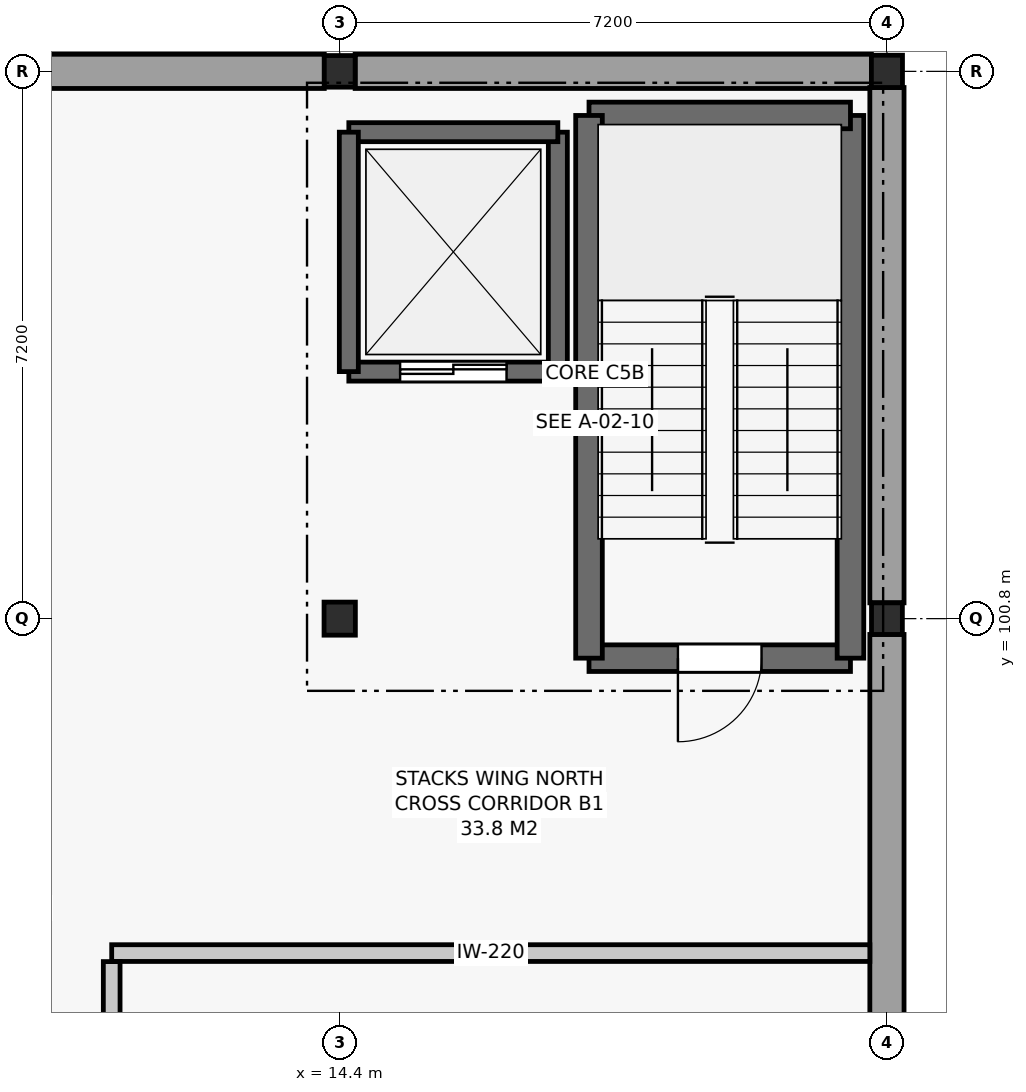
"""IFC4 building model, lengths in metres.
Left out: names, types, materials, properties, quantities, classifications, styles, units other than length and angle.
Written with IfcOpenShell. Run it as: python <this file> out.ifc"""

import sys

from ifc_helpers import new_model, si_unit, direction, frame, frame_2d, origin, origin_2d, place, context, subcontext, project, spatial, rectangle, i_section, extrude, element, fill, save


model = new_model("IFC4")
c1 = context("Model", 3, precision=1e-05, world=origin(), true_north=direction((0.0, 1.0)))
c2 = subcontext(c1, "Body", "Model", "MODEL_VIEW")
j1 = project(units=[si_unit("LENGTHUNIT", "METRE"), si_unit("PLANEANGLEUNIT", "RADIAN")], contexts=[c1])
p1 = place(None, origin())
s1 = spatial("IfcSite", under=j1, at=p1, CompositionType="ELEMENT")
p2 = place(p1, origin())
s2 = spatial("IfcBuilding", under=s1, at=p2, CompositionType="ELEMENT")
p3 = place(p2, frame((0.0, 0.0, -4.2)))
s3 = spatial("IfcBuildingStorey", under=s2, at=p3, CompositionType="ELEMENT", Elevation=-4.2)
p4 = place(p3, frame((14.4, 100.8, 0.0), z_axis=(0.0, 0.0, 1.0), x_axis=(1.0, 0.0, 0.0)))
e1 = element("IfcColumn", 1, at=p4, inside=s3, PredefinedType="COLUMN", context=c2, shape_type="SweptSolid", body=[
    extrude(i_section(OverallWidth=0.412, OverallDepth=0.435, WebThickness=0.025, FlangeThickness=0.042, FilletRadius=0.015, at=origin_2d()), origin(), (0.0, 0.0, 1.0), 4.2),
])
for number, where, z_axis, x_axis in (
    (2, (14.4, 108.0, 0.0), (0.0, 0.0, 1.0), (1.0, 0.0, 0.0)),
    (3, (21.6, 100.8, 0.0), (0.0, 0.0, 1.0), (1.0, 0.0, 0.0)),
):
    element("IfcColumn", number, at=place(p3, frame(where, z_axis=z_axis, x_axis=x_axis)), inside=s3, PredefinedType="COLUMN", context=c2, shape_type="SweptSolid", body=[
        extrude(i_section(OverallWidth=0.406, OverallDepth=0.416, WebThickness=0.021, FlangeThickness=0.034, FilletRadius=0.015, at=origin_2d()), origin(), (0.0, 0.0, 1.0), 4.2),
    ])
p5 = place(p3, frame((21.6, 108.0, 0.0), z_axis=(0.0, 0.0, 1.0), x_axis=(1.0, 0.0, 0.0)))
e4 = element("IfcColumn", 4, at=p5, inside=s3, PredefinedType="COLUMN", context=c2, shape_type="SweptSolid", body=[
    extrude(i_section(OverallWidth=0.409, OverallDepth=0.425, WebThickness=0.023, FlangeThickness=0.039, FilletRadius=0.015, at=origin_2d()), origin(), (0.0, 0.0, 1.0), 4.2),
])
p6 = place(p3, frame((7.403, 108.0, 0.0), z_axis=(0.0, 0.0, 1.0), x_axis=(1.0, 0.0, 0.0)))
e5 = element("IfcWall", 5, at=p6, inside=s3, PredefinedType="USERDEFINED", context=c2, shape_type="SweptSolid", body=[
    extrude(rectangle(XDim=6.794, YDim=0.45, at=frame_2d((3.397, 0.0))), origin(), (0.0, 0.0, 1.0), 3.26),
])
p7 = place(p3, frame((14.603, 108.0, 0.0), z_axis=(0.0, 0.0, 1.0), x_axis=(1.0, 0.0, 0.0)))
e6 = element("IfcWall", 6, at=p7, inside=s3, PredefinedType="USERDEFINED", context=c2, shape_type="SweptSolid", body=[
    extrude(rectangle(XDim=6.792, YDim=0.45, at=frame_2d((3.396, 0.0))), origin(), (0.0, 0.0, 1.0), 3.26),
])
p8 = place(p3, frame((21.6, 93.808, 0.0), z_axis=(0.0, 0.0, 1.0), x_axis=(0.0, 1.0, 0.0)))
e7 = element("IfcWall", 7, at=p8, inside=s3, PredefinedType="USERDEFINED", context=c2, shape_type="SweptSolid", body=[
    extrude(rectangle(XDim=6.784, YDim=0.45, at=frame_2d((3.392, 0.0))), origin(), (0.0, 0.0, 1.0), 3.26),
])
p9 = place(p3, frame((21.6, 101.008, 0.0), z_axis=(0.0, 0.0, 1.0), x_axis=(0.0, 1.0, 0.0)))
e8 = element("IfcWall", 8, at=p9, inside=s3, PredefinedType="USERDEFINED", context=c2, shape_type="SweptSolid", body=[
    extrude(rectangle(XDim=6.78, YDim=0.45, at=frame_2d((3.39, 0.0))), origin(), (0.0, 0.0, 1.0), 3.26),
])
p10 = place(p3, frame((17.68, 100.28, 0.0), z_axis=(0.0, 0.0, 1.0), x_axis=(1.0, 0.0, 0.0)))
e9 = element("IfcWall", 9, at=p10, inside=s3, PredefinedType="SHEAR", context=c2, shape_type="SweptSolid", body=[
    extrude(rectangle(XDim=3.44, YDim=0.35, at=frame_2d((1.72, 0.0))), origin(), (0.0, 0.0, 1.0), 3.88),
])
p11 = place(p10, frame((1.17, 0.0, 0.0)))
e10 = element("IfcOpeningElement", 10, at=p11, cuts=e9, PredefinedType="OPENING", context=c2, shape_type="SweptSolid", body=[
    extrude(rectangle(XDim=1.1, YDim=2.15, at=frame_2d((0.55, 1.075))), frame((0.0, 0.187, 0.0), z_axis=(0.0, -1.0, 0.0), x_axis=(1.0, 0.0, 0.0)), (0.0, 0.0, 1.0), 0.374),
])
p12 = place(p3, frame((21.12, 100.28, 0.0), z_axis=(0.0, 0.0, 1.0), x_axis=(0.0, 1.0, 0.0)))
e11 = element("IfcWall", 11, at=p12, inside=s3, PredefinedType="SHEAR", context=c2, shape_type="SweptSolid", body=[
    extrude(rectangle(XDim=7.14, YDim=0.35, at=frame_2d((3.57, 0.0))), origin(), (0.0, 0.0, 1.0), 3.88),
])
p13 = place(p3, frame((21.12, 107.42, 0.0), z_axis=(0.0, 0.0, 1.0), x_axis=(-1.0, 0.0, 0.0)))
e12 = element("IfcWall", 12, at=p13, inside=s3, PredefinedType="SHEAR", context=c2, shape_type="SweptSolid", body=[
    extrude(rectangle(XDim=3.44, YDim=0.35, at=frame_2d((1.72, 0.0))), origin(), (0.0, 0.0, 1.0), 3.88),
])
p14 = place(p3, frame((17.68, 107.42, 0.0), z_axis=(0.0, 0.0, 1.0), x_axis=(0.0, -1.0, 0.0)))
e13 = element("IfcWall", 13, at=p14, inside=s3, PredefinedType="SHEAR", context=c2, shape_type="SweptSolid", body=[
    extrude(rectangle(XDim=7.14, YDim=0.35, at=frame_2d((3.57, 0.0))), origin(), (0.0, 0.0, 1.0), 3.88),
])
p15 = place(p3, frame((14.52, 104.05, 0.0), z_axis=(0.0, 0.0, 1.0), x_axis=(1.0, 0.0, 0.0)))
e14 = element("IfcWall", 14, at=p15, inside=s3, PredefinedType="SHEAR", context=c2, shape_type="SweptSolid", body=[
    extrude(rectangle(XDim=2.75, YDim=0.25, at=frame_2d((1.375, 0.0))), origin(), (0.0, 0.0, 1.0), 3.88),
])
p16 = place(p15, frame((0.675, 0.0, 0.0)))
e15 = element("IfcOpeningElement", 15, at=p16, cuts=e14, PredefinedType="OPENING", context=c2, shape_type="SweptSolid", body=[
    extrude(rectangle(XDim=1.4, YDim=2.2, at=frame_2d((0.7, 1.1))), frame((0.0, 0.137, 0.0), z_axis=(0.0, -1.0, 0.0), x_axis=(1.0, 0.0, 0.0)), (0.0, 0.0, 1.0), 0.274),
])
p17 = place(p3, frame((17.27, 104.05, 0.0), z_axis=(0.0, 0.0, 1.0), x_axis=(0.0, 1.0, 0.0)))
e16 = element("IfcWall", 16, at=p17, inside=s3, PredefinedType="SHEAR", context=c2, shape_type="SweptSolid", body=[
    extrude(rectangle(XDim=3.15, YDim=0.25, at=frame_2d((1.575, 0.0))), origin(), (0.0, 0.0, 1.0), 3.88),
])
p18 = place(p3, frame((17.27, 107.2, 0.0), z_axis=(0.0, 0.0, 1.0), x_axis=(-1.0, 0.0, 0.0)))
e17 = element("IfcWall", 17, at=p18, inside=s3, PredefinedType="SHEAR", context=c2, shape_type="SweptSolid", body=[
    extrude(rectangle(XDim=2.75, YDim=0.25, at=frame_2d((1.375, 0.0))), origin(), (0.0, 0.0, 1.0), 3.88),
])
p19 = place(p3, frame((14.52, 107.2, 0.0), z_axis=(0.0, 0.0, 1.0), x_axis=(0.0, -1.0, 0.0)))
e18 = element("IfcWall", 18, at=p19, inside=s3, PredefinedType="SHEAR", context=c2, shape_type="SweptSolid", body=[
    extrude(rectangle(XDim=3.15, YDim=0.25, at=frame_2d((1.575, 0.0))), origin(), (0.0, 0.0, 1.0), 3.88),
])
p20 = place(p3, frame((11.4, 96.4, 0.0), z_axis=(0.0, 0.0, 1.0), x_axis=(1.0, 0.0, 0.0)))
e19 = element("IfcWall", 19, at=p20, inside=s3, PredefinedType="SOLIDWALL", context=c2, shape_type="SweptSolid", body=[
    extrude(rectangle(XDim=9.975, YDim=0.22, at=frame_2d((4.988, 0.0))), origin(), (0.0, 0.0, 1.0), 3.175),
])
p21 = place(p3, frame((11.4, 72.112, 0.0), z_axis=(0.0, 0.0, 1.0), x_axis=(0.0, 1.0, 0.0)))
e20 = element("IfcWall", 20, at=p21, inside=s3, PredefinedType="SOLIDWALL", context=c2, shape_type="SweptSolid", body=[
    extrude(rectangle(XDim=24.176, YDim=0.22, at=frame_2d((12.088, 0.0))), origin(), (0.0, 0.0, 1.0), 3.215),
])
p22 = place(p21, frame((11.488, 0.0, 0.0)))
e21 = element("IfcOpeningElement", 21, at=p22, cuts=e20, PredefinedType="OPENING", context=c2, shape_type="SweptSolid", body=[
    extrude(rectangle(XDim=1.2, YDim=2.2, at=frame_2d((0.6, 1.1))), frame((0.0, 0.122, 0.0), z_axis=(0.0, -1.0, 0.0), x_axis=(1.0, 0.0, 0.0)), (0.0, 0.0, 1.0), 0.244),
])
p23 = place(p11, frame((1.1, 0.0, 0.0), z_axis=(0.0, 0.0, 1.0), x_axis=(-1.0, 0.0, 0.0)))
e22 = element("IfcDoor", 22, at=p23, inside=s3, OperationType="SINGLE_SWING_RIGHT", PredefinedType="DOOR", context=c2, shape_type="SweptSolid", body=[
    extrude(rectangle(XDim=1.1, YDim=2.15, at=frame_2d((0.55, 1.075))), frame((0.0, 0.025, 0.0), z_axis=(0.0, -1.0, 0.0), x_axis=(1.0, 0.0, 0.0)), (0.0, 0.0, 1.0), 0.05),
])
fill(e10, e22)
p24 = place(p16, origin())
e23 = element("IfcDoor", 23, at=p24, inside=s3, OperationType="DOUBLE_DOOR_SLIDING", PredefinedType="DOOR", context=c2, shape_type="SweptSolid", body=[
    extrude(rectangle(XDim=1.4, YDim=2.2, at=frame_2d((0.7, 1.1))), frame((0.0, 0.025, 0.0), z_axis=(0.0, -1.0, 0.0), x_axis=(1.0, 0.0, 0.0)), (0.0, 0.0, 1.0), 0.05),
])
fill(e15, e23)
save(model, sys.argv[1])
